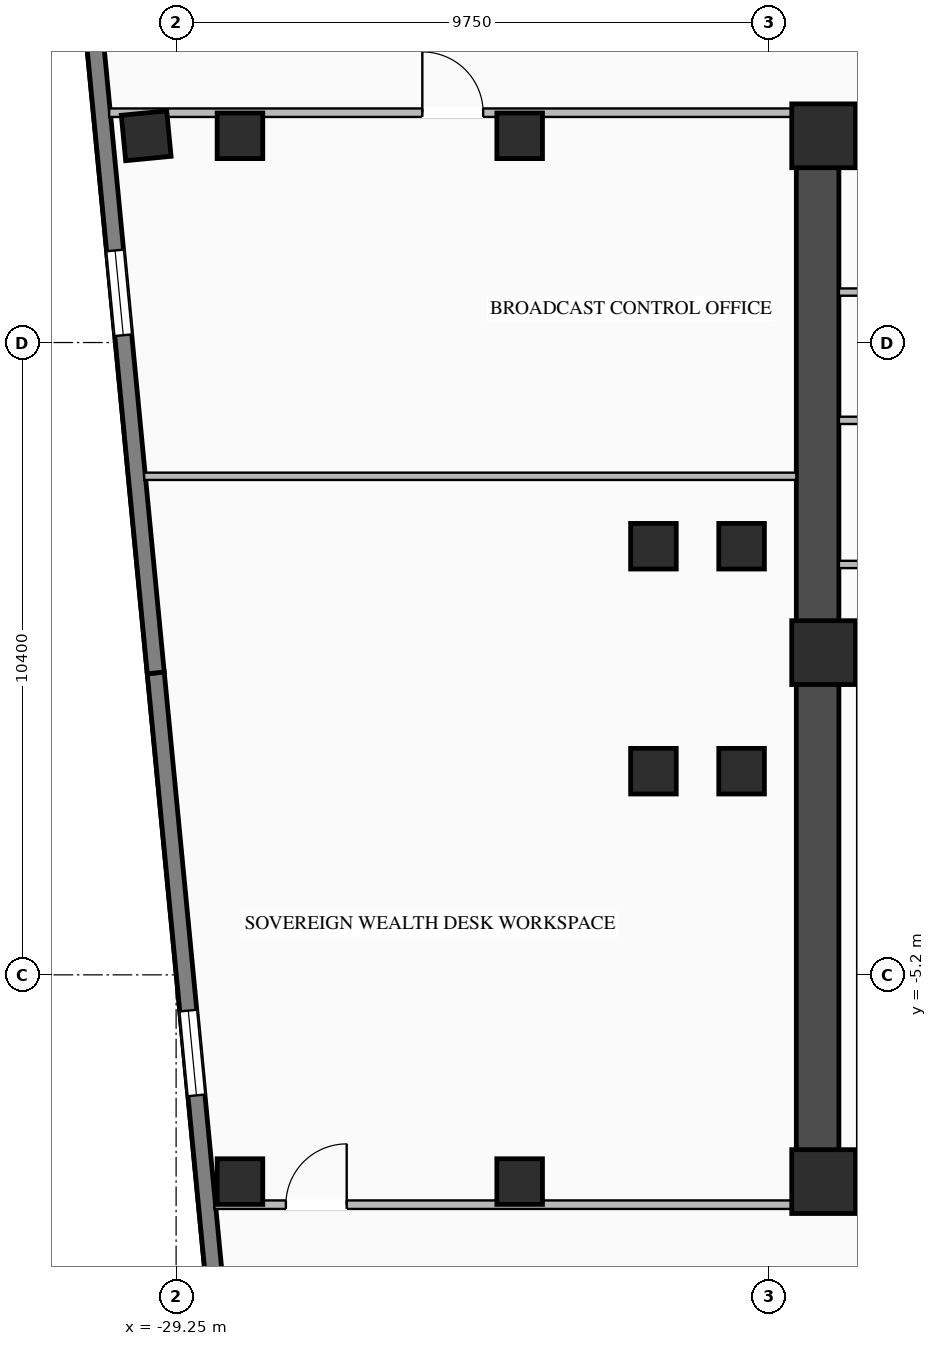
"""IFC4 building model, lengths in metres.
Left out: names, types, materials, properties, quantities, classifications, styles, units other than length and angle.
Written with IfcOpenShell. Run it as: python <this file> out.ifc"""

import sys

from ifc_helpers import new_model, si_unit, direction, frame, frame_2d, origin, origin_2d, place, context, subcontext, project, spatial, rectangle, i_section, extrude, element, fill, save


model = new_model("IFC4")
c1 = context("Model", 3, precision=1e-05, world=origin(), true_north=direction((0.0, 1.0)))
c2 = subcontext(c1, "Body", "Model", "MODEL_VIEW")
j1 = project(units=[si_unit("LENGTHUNIT", "METRE"), si_unit("PLANEANGLEUNIT", "RADIAN")], contexts=[c1])
p1 = place(None, origin())
s1 = spatial("IfcSite", under=j1, at=p1, CompositionType="ELEMENT")
p2 = place(p1, origin())
s2 = spatial("IfcBuilding", under=s1, at=p2, CompositionType="ELEMENT")
p3 = place(p2, frame((0.0, 0.0, 74.2)))
s3 = spatial("IfcBuildingStorey", under=s2, at=p3, CompositionType="ELEMENT", Elevation=74.2)
p4 = place(p3, frame((-19.05, -8.7, 0.0), z_axis=(0.0, 0.0, 1.0), x_axis=(1.0, 0.0, 0.0)))
e1 = element("IfcWall", 1, at=p4, inside=s3, PredefinedType="SHEAR", context=c2, shape_type="SweptSolid", body=[
    extrude(rectangle(XDim=10.25, YDim=0.7, at=frame_2d((5.125, 0.0))), origin(), (0.0, 0.0, 1.0), 3.27),
])
p5 = place(p3, frame((-19.05, 8.7, 0.0), z_axis=(0.0, 0.0, 1.0), x_axis=(1.0, 0.0, 0.0)))
e2 = element("IfcWall", 2, at=p5, inside=s3, PredefinedType="SHEAR", context=c2, shape_type="SweptSolid", body=[
    extrude(rectangle(XDim=10.25, YDim=0.7, at=frame_2d((5.125, 0.0))), origin(), (0.0, 0.0, 1.0), 3.27),
])
p6 = place(p5, frame((5.6, 0.0, 0.0)))
e3 = element("IfcOpeningElement", 3, at=p6, cuts=e2, PredefinedType="OPENING", context=c2, shape_type="SweptSolid", body=[
    extrude(rectangle(XDim=1.4, YDim=2.05, at=frame_2d((0.7, 1.025))), frame((0.0, 0.36, 0.0), z_axis=(0.0, -1.0, 0.0), x_axis=(1.0, 0.0, 0.0)), (0.0, 0.0, 1.0), 0.72),
])
p7 = place(p3, frame((-18.7, -8.35, 0.0), z_axis=(0.0, 0.0, 1.0), x_axis=(0.0, 1.0, 0.0)))
e4 = element("IfcWall", 4, at=p7, inside=s3, PredefinedType="SHEAR", context=c2, shape_type="SweptSolid", body=[
    extrude(rectangle(XDim=16.7, YDim=0.7, at=frame_2d((8.35, 0.0))), origin(), (0.0, 0.0, 1.0), 3.27),
])
for number, where, z_axis, x_axis in (
    (5, (-18.6, -8.6, 0.0), (0.0, 0.0, 1.0), (1.0, 0.0, 0.0)),
    (6, (-18.6, 0.1, 0.0), (0.0, 0.0, 1.0), (1.0, 0.0, 0.0)),
    (7, (-18.6, 8.6, 0.0), (0.0, 0.0, 1.0), (1.0, 0.0, 0.0)),
):
    element("IfcColumn", number, at=place(p3, frame(where, z_axis=z_axis, x_axis=x_axis)), inside=s3, PredefinedType="COLUMN", context=c2, shape_type="SweptSolid", body=[
        extrude(rectangle(XDim=1.05, YDim=1.05, at=origin_2d()), origin(), (0.0, 0.0, 1.0), 3.45),
    ])
for number, where, z_axis, x_axis in (
    (8, (-21.4, -1.85, 0.0), (0.0, 0.0, 1.0), (1.0, 0.0, 0.0)),
    (9, (-21.4, 1.85, 0.0), (0.0, 0.0, 1.0), (1.0, 0.0, 0.0)),
    (10, (-19.95, -1.85, 0.0), (0.0, 0.0, 1.0), (1.0, 0.0, 0.0)),
    (11, (-19.95, 1.85, 0.0), (0.0, 0.0, 1.0), (1.0, 0.0, 0.0)),
    (12, (-23.6, -8.6, 0.0), (0.0, 0.0, 1.0), (1.0, 0.0, 0.0)),
    (13, (-23.6, 8.6, 0.0), (0.0, 0.0, 1.0), (1.0, 0.0, 0.0)),
    (14, (-28.2, -8.6, 0.0), (0.0, 0.0, 1.0), (1.0, 0.0, 0.0)),
    (15, (-28.2, 8.6, 0.0), (0.0, 0.0, 1.0), (1.0, 0.0, 0.0)),
    (16, (-29.742, 8.6, 0.0), (0.0, 0.0, 1.0), (0.995, 0.096, 0.0)),
):
    element("IfcColumn", number, at=place(p3, frame(where, z_axis=z_axis, x_axis=x_axis)), inside=s3, PredefinedType="COLUMN", context=c2, shape_type="SweptSolid", body=[
        extrude(i_section(OverallWidth=0.75, OverallDepth=0.75, WebThickness=0.03, FlangeThickness=0.044, at=origin_2d()), origin(), (0.0, 0.0, 1.0), 3.45),
    ])
p8 = place(p3, frame((-27.779, -18.987, 0.0), z_axis=(0.0, 0.0, 1.0), x_axis=(-0.095842534142, 0.995396508256, 0.0)))
e17 = element("IfcWall", 17, at=p8, inside=s3, PredefinedType="STANDARD", context=c2, shape_type="SweptSolid", body=[
    extrude(rectangle(XDim=18.84, YDim=0.28, at=frame_2d((9.42, 0.0))), origin(), (0.0, 0.0, 1.0), 3.25),
])
p9 = place(p8, frame((5.58, 0.0, 0.76)))
e18 = element("IfcOpeningElement", 18, at=p9, cuts=e17, PredefinedType="OPENING", context=c2, shape_type="SweptSolid", body=[
    extrude(rectangle(XDim=1.4, YDim=1.95, at=frame_2d((0.7, 0.975))), frame((0.0, 0.15, 0.0), z_axis=(0.0, -1.0, 0.0), x_axis=(1.0, 0.0, 0.0)), (0.0, 0.0, 1.0), 0.3),
])
p10 = place(p8, frame((11.86, 0.0, 0.76)))
e19 = element("IfcOpeningElement", 19, at=p10, cuts=e17, PredefinedType="OPENING", context=c2, shape_type="SweptSolid", body=[
    extrude(rectangle(XDim=1.4, YDim=1.95, at=frame_2d((0.7, 0.975))), frame((0.0, 0.15, 0.0), z_axis=(0.0, -1.0, 0.0), x_axis=(1.0, 0.0, 0.0)), (0.0, 0.0, 1.0), 0.3),
])
p11 = place(p3, frame((-29.585, -0.234, 0.0), z_axis=(0.0, 0.0, 1.0), x_axis=(-0.095841297881, 0.99539662729, 0.0)))
e20 = element("IfcWall", 20, at=p11, inside=s3, PredefinedType="STANDARD", context=c2, shape_type="SweptSolid", body=[
    extrude(rectangle(XDim=18.84, YDim=0.28, at=frame_2d((9.42, 0.0))), origin(), (0.0, 0.0, 1.0), 3.25),
])
p12 = place(p11, frame((5.58, 0.0, 0.76)))
e21 = element("IfcOpeningElement", 21, at=p12, cuts=e20, PredefinedType="OPENING", context=c2, shape_type="SweptSolid", body=[
    extrude(rectangle(XDim=1.4, YDim=1.95, at=frame_2d((0.7, 0.975))), frame((0.0, 0.15, 0.0), z_axis=(0.0, -1.0, 0.0), x_axis=(1.0, 0.0, 0.0)), (0.0, 0.0, 1.0), 0.3),
])
p13 = place(p11, frame((11.86, 0.0, 0.76)))
e22 = element("IfcOpeningElement", 22, at=p13, cuts=e20, PredefinedType="OPENING", context=c2, shape_type="SweptSolid", body=[
    extrude(rectangle(XDim=1.4, YDim=1.95, at=frame_2d((0.7, 0.975))), frame((0.0, 0.15, 0.0), z_axis=(0.0, -1.0, 0.0), x_axis=(1.0, 0.0, 0.0)), (0.0, 0.0, 1.0), 0.3),
])
p14 = place(p3, frame((-18.35, 3.92, 0.0), z_axis=(0.0, 0.0, 1.0), x_axis=(1.0, 0.0, 0.0)))
e23 = element("IfcWall", 23, at=p14, inside=s3, PredefinedType="STANDARD", context=c2, shape_type="SweptSolid", body=[
    extrude(rectangle(XDim=4.45, YDim=0.12, at=frame_2d((2.225, 0.0))), origin(), (0.0, 0.0, 1.0), 3.25),
])
p15 = place(p3, frame((-18.35, 6.03, 0.0), z_axis=(0.0, 0.0, 1.0), x_axis=(1.0, 0.0, 0.0)))
e24 = element("IfcWall", 24, at=p15, inside=s3, PredefinedType="STANDARD", context=c2, shape_type="SweptSolid", body=[
    extrude(rectangle(XDim=2.2, YDim=0.12, at=frame_2d((1.1, 0.0))), origin(), (0.0, 0.0, 1.0), 3.25),
])
p16 = place(p3, frame((-18.35, 1.55, 0.0), z_axis=(0.0, 0.0, 1.0), x_axis=(1.0, 0.0, 0.0)))
e25 = element("IfcWall", 25, at=p16, inside=s3, PredefinedType="STANDARD", context=c2, shape_type="SweptSolid", body=[
    extrude(rectangle(XDim=4.45, YDim=0.12, at=frame_2d((2.225, 0.0))), origin(), (0.0, 0.0, 1.0), 3.25),
])
p17 = place(p3, frame((-30.351, 8.98, 0.0), z_axis=(0.0, 0.0, 1.0), x_axis=(1.0, 0.0, 0.0)))
e26 = element("IfcWall", 26, at=p17, inside=s3, PredefinedType="STANDARD", context=c2, shape_type="SweptSolid", body=[
    extrude(rectangle(XDim=11.301, YDim=0.14, at=frame_2d((5.651, 0.0))), origin(), (0.0, 0.0, 1.0), 3.25),
])
p18 = place(p17, frame((5.151, 0.0, 0.0)))
e27 = element("IfcOpeningElement", 27, at=p18, cuts=e26, PredefinedType="OPENING", context=c2, shape_type="SweptSolid", body=[
    extrude(rectangle(XDim=1.0, YDim=2.08, at=frame_2d((0.5, 1.04))), frame((0.0, 0.08, 0.0), z_axis=(0.0, -1.0, 0.0), x_axis=(1.0, 0.0, 0.0)), (0.0, 0.0, 1.0), 0.16),
])
p19 = place(p3, frame((-28.622, -8.98, 0.0), z_axis=(0.0, 0.0, 1.0), x_axis=(1.0, 0.0, 0.0)))
e28 = element("IfcWall", 28, at=p19, inside=s3, PredefinedType="STANDARD", context=c2, shape_type="SweptSolid", body=[
    extrude(rectangle(XDim=9.572, YDim=0.14, at=frame_2d((4.786, 0.0))), origin(), (0.0, 0.0, 1.0), 3.25),
])
p20 = place(p19, frame((1.177, 0.0, 0.0)))
e29 = element("IfcOpeningElement", 29, at=p20, cuts=e28, PredefinedType="OPENING", context=c2, shape_type="SweptSolid", body=[
    extrude(rectangle(XDim=1.0, YDim=2.08, at=frame_2d((0.5, 1.04))), frame((0.0, 0.08, 0.0), z_axis=(0.0, -1.0, 0.0), x_axis=(1.0, 0.0, 0.0)), (0.0, 0.0, 1.0), 0.16),
])
p21 = place(p3, frame((-29.775, 3.0, 0.0), z_axis=(0.0, 0.0, 1.0), x_axis=(1.0, 0.0, 0.0)))
e30 = element("IfcWall", 30, at=p21, inside=s3, PredefinedType="STANDARD", context=c2, shape_type="SweptSolid", body=[
    extrude(rectangle(XDim=10.725, YDim=0.12, at=frame_2d((5.363, 0.0))), origin(), (0.0, 0.0, 1.0), 3.25),
])
p22 = place(p10, origin())
e31 = element("IfcWindow", 31, at=p22, inside=s3, PartitioningType="SINGLE_PANEL", PredefinedType="WINDOW", context=c2, shape_type="SweptSolid", body=[
    extrude(rectangle(XDim=1.4, YDim=1.95, at=frame_2d((0.7, 0.975))), frame((0.0, 0.03, 0.0), z_axis=(0.0, -1.0, 0.0), x_axis=(1.0, 0.0, 0.0)), (0.0, 0.0, 1.0), 0.06),
])
fill(e19, e31)
p23 = place(p12, origin())
e32 = element("IfcWindow", 32, at=p23, inside=s3, PartitioningType="SINGLE_PANEL", PredefinedType="WINDOW", context=c2, shape_type="SweptSolid", body=[
    extrude(rectangle(XDim=1.4, YDim=1.95, at=frame_2d((0.7, 0.975))), frame((0.0, 0.03, 0.0), z_axis=(0.0, -1.0, 0.0), x_axis=(1.0, 0.0, 0.0)), (0.0, 0.0, 1.0), 0.06),
])
fill(e21, e32)
p24 = place(p18, origin())
e33 = element("IfcDoor", 33, at=p24, inside=s3, OperationType="SINGLE_SWING_LEFT", PredefinedType="DOOR", context=c2, shape_type="SweptSolid", body=[
    extrude(rectangle(XDim=1.0, YDim=2.08, at=frame_2d((0.5, 1.04))), frame((0.0, 0.025, 0.0), z_axis=(0.0, -1.0, 0.0), x_axis=(1.0, 0.0, 0.0)), (0.0, 0.0, 1.0), 0.05),
])
fill(e27, e33)
p25 = place(p20, origin())
e34 = element("IfcDoor", 34, at=p25, inside=s3, OperationType="SINGLE_SWING_RIGHT", PredefinedType="DOOR", context=c2, shape_type="SweptSolid", body=[
    extrude(rectangle(XDim=1.0, YDim=2.08, at=frame_2d((0.5, 1.04))), frame((0.0, 0.025, 0.0), z_axis=(0.0, -1.0, 0.0), x_axis=(1.0, 0.0, 0.0)), (0.0, 0.0, 1.0), 0.05),
])
fill(e29, e34)
save(model, sys.argv[1])
